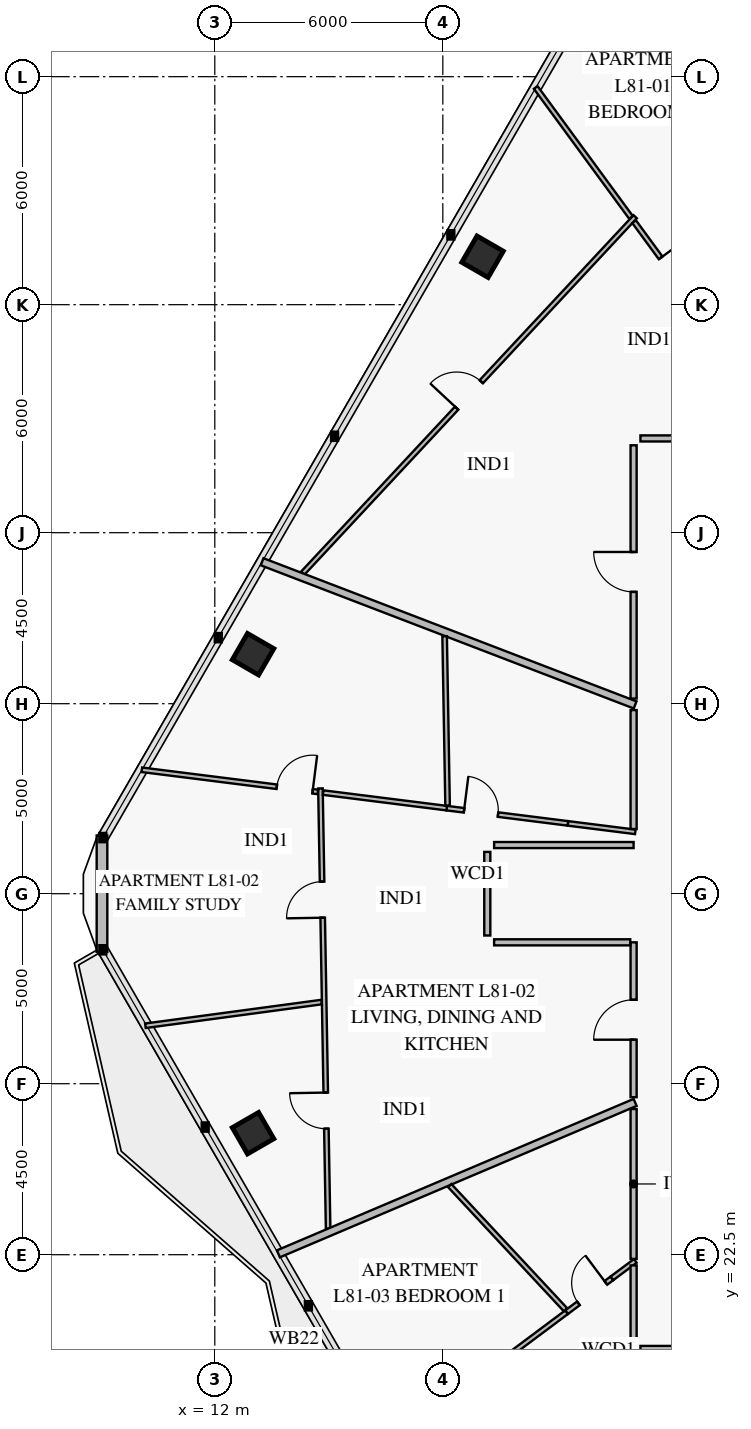
"""IFC4 building model, lengths in metres.
Left out: names, types, materials, properties, quantities, classifications, styles, units other than length and angle.
Written with IfcOpenShell. Run it as: python <this file> out.ifc"""

import sys

from ifc_helpers import new_model, si_unit, direction, frame, frame_2d, origin, origin_2d, place, context, subcontext, project, spatial, rectangle, extrude, element, fill, save


model = new_model("IFC4")
c1 = context("Model", 3, precision=1e-05, world=origin(), true_north=direction((0.0, 1.0)))
c2 = subcontext(c1, "Body", "Model", "MODEL_VIEW")
j1 = project(units=[si_unit("LENGTHUNIT", "METRE"), si_unit("PLANEANGLEUNIT", "RADIAN")], contexts=[c1])
p1 = place(None, origin())
s1 = spatial("IfcSite", under=j1, at=p1, CompositionType="ELEMENT")
p2 = place(p1, origin())
s2 = spatial("IfcBuilding", under=s1, at=p2, CompositionType="ELEMENT")
p3 = place(p2, frame((0.0, 0.0, 319.6)))
s3 = spatial("IfcBuildingStorey", under=s2, at=p3, CompositionType="ELEMENT", Elevation=319.6)
for number, where, z_axis, x_axis in (
    (1, (19.045, 48.762, 0.0), (0.0, 0.0, 1.0), (-0.5, -0.866, 0.0)),
    (2, (13.007, 38.302, 0.0), (0.0, 0.0, 1.0), (-0.5, -0.866, 0.0)),
    (3, (13.007, 25.698, 0.0), (0.0, 0.0, 1.0), (0.5, -0.866, 0.0)),
):
    element("IfcColumn", number, at=place(p3, frame(where, z_axis=z_axis, x_axis=x_axis)), inside=s3, PredefinedType="COLUMN", context=c2, shape_type="SweptSolid", body=[
        extrude(rectangle(XDim=0.8, YDim=0.8, at=origin_2d()), origin(), (0.0, 0.0, 1.0), 3.55),
    ])
p4 = place(p3, frame((9.031, 30.468, 0.0), z_axis=(0.0, 0.0, 1.0), x_axis=(0.0, 1.0, 0.0)))
e4 = element("IfcWall", 4, at=p4, inside=s3, PredefinedType="SOLIDWALL", context=c2, shape_type="SweptSolid", body=[
    extrude(rectangle(XDim=3.065, YDim=0.28, at=frame_2d((1.532, 0.0))), origin(), (0.0, 0.0, 1.0), 3.55),
])
p5 = place(p3, frame((23.062, 49.815, 0.0), z_axis=(0.0, 0.0, 1.0), x_axis=(-0.681996709379, -0.731355240903, 0.0)))
e5 = element("IfcWall", 5, at=p5, inside=s3, PredefinedType="PARTITIONING", context=c2, shape_type="SweptSolid", body=[
    extrude(rectangle(XDim=12.826, YDim=0.12, at=frame_2d((6.413, 0.0))), origin(), (0.0, 0.0, 1.0), 2.97),
])
p6 = place(p5, frame((5.938, 0.0, 0.0)))
e6 = element("IfcOpeningElement", 6, at=p6, cuts=e5, PredefinedType="OPENING", context=c2, shape_type="SweptSolid", body=[
    extrude(rectangle(XDim=0.95, YDim=2.1, at=frame_2d((0.475, 1.05))), frame((0.0, 0.072, 0.0), z_axis=(0.0, -1.0, 0.0), x_axis=(1.0, 0.0, 0.0)), (0.0, 0.0, 1.0), 0.144),
])
p7 = place(p3, frame((25.662, 46.099, 0.0), z_axis=(0.0, 0.0, 1.0), x_axis=(-0.591311292855, 0.806443398474, 0.0)))
e7 = element("IfcWall", 7, at=p7, inside=s3, PredefinedType="PARTITIONING", context=c2, shape_type="SweptSolid", body=[
    extrude(rectangle(XDim=4.446, YDim=0.12, at=frame_2d((2.223, 0.0))), origin(), (0.0, 0.0, 1.0), 3.55),
])
p8 = place(p7, frame((2.314, 0.0, 0.0)))
e8 = element("IfcOpeningElement", 8, at=p8, cuts=e7, PredefinedType="OPENING", context=c2, shape_type="SweptSolid", body=[
    extrude(rectangle(XDim=0.95, YDim=2.1, at=frame_2d((0.475, 1.05))), frame((0.0, 0.072, 0.0), z_axis=(0.0, -1.0, 0.0), x_axis=(1.0, 0.0, 0.0)), (0.0, 0.0, 1.0), 0.144),
])
p9 = place(p3, frame((22.951, 49.796, 0.0), z_axis=(0.0, 0.0, 1.0), x_axis=(-0.591303744842, 0.806448932875, 0.0)))
e9 = element("IfcWall", 9, at=p9, inside=s3, PredefinedType="PARTITIONING", context=c2, shape_type="SweptSolid", body=[
    extrude(rectangle(XDim=4.24, YDim=0.12, at=frame_2d((2.12, 0.0))), origin(), (0.0, 0.0, 1.0), 2.97),
])
p10 = place(p3, frame((23.02, 43.8, 0.0), z_axis=(0.0, 0.0, 1.0), x_axis=(0.0, -1.0, 0.0)))
e10 = element("IfcWall", 10, at=p10, inside=s3, PredefinedType="PARTITIONING", context=c2, shape_type="SweptSolid", body=[
    extrude(rectangle(XDim=6.666, YDim=0.16, at=frame_2d((3.333, 0.0))), origin(), (0.0, 0.0, 1.0), 3.55),
])
p11 = place(p10, frame((2.808, 0.0, 0.0)))
e11 = element("IfcOpeningElement", 11, at=p11, cuts=e10, PredefinedType="OPENING", context=c2, shape_type="SweptSolid", body=[
    extrude(rectangle(XDim=1.05, YDim=2.15, at=frame_2d((0.525, 1.075))), frame((0.0, 0.092, 0.0), z_axis=(0.0, -1.0, 0.0), x_axis=(1.0, 0.0, 0.0)), (0.0, 0.0, 1.0), 0.184),
])
p12 = place(p3, frame((14.78, 34.77, 0.0), z_axis=(0.0, 0.0, 1.0), x_axis=(0.017447291159, -0.999847784431, 0.0)))
e12 = element("IfcWall", 12, at=p12, inside=s3, PredefinedType="PARTITIONING", context=c2, shape_type="SweptSolid", body=[
    extrude(rectangle(XDim=11.586, YDim=0.12, at=frame_2d((5.793, 0.0))), origin(), (0.0, 0.0, 1.0), 3.0),
])
p13 = place(p12, frame((2.453, 0.0, 0.0)))
e13 = element("IfcOpeningElement", 13, at=p13, cuts=e12, PredefinedType="OPENING", context=c2, shape_type="SweptSolid", body=[
    extrude(rectangle(XDim=0.95, YDim=2.1, at=frame_2d((0.475, 1.05))), frame((0.0, 0.072, 0.0), z_axis=(0.0, -1.0, 0.0), x_axis=(1.0, 0.0, 0.0)), (0.0, 0.0, 1.0), 0.144),
])
p14 = place(p12, frame((8.005, 0.0, 0.0)))
e14 = element("IfcOpeningElement", 14, at=p14, cuts=e12, PredefinedType="OPENING", context=c2, shape_type="SweptSolid", body=[
    extrude(rectangle(XDim=0.95, YDim=2.1, at=frame_2d((0.475, 1.05))), frame((0.0, 0.072, 0.0), z_axis=(0.0, -1.0, 0.0), x_axis=(1.0, 0.0, 0.0)), (0.0, 0.0, 1.0), 0.144),
])
p15 = place(p3, frame((21.294, 33.85, 0.0), z_axis=(0.0, 0.0, 1.0), x_axis=(-0.992178326729, 0.1248285543, 0.0)))
e15 = element("IfcWall", 15, at=p15, inside=s3, PredefinedType="PARTITIONING", context=c2, shape_type="SweptSolid", body=[
    extrude(rectangle(XDim=3.217, YDim=0.12, at=frame_2d((1.609, 0.0))), origin(), (0.0, 0.0, 1.0), 3.55),
])
p16 = place(p15, frame((1.856, 0.0, 0.0)))
e16 = element("IfcOpeningElement", 16, at=p16, cuts=e15, PredefinedType="OPENING", context=c2, shape_type="SweptSolid", body=[
    extrude(rectangle(XDim=0.9, YDim=2.1, at=frame_2d((0.45, 1.05))), frame((0.0, 0.072, 0.0), z_axis=(0.0, -1.0, 0.0), x_axis=(1.0, 0.0, 0.0)), (0.0, 0.0, 1.0), 0.144),
])
p17 = place(p3, frame((18.102, 34.252, 0.0), z_axis=(0.0, 0.0, 1.0), x_axis=(-0.992185927593, 0.124768125279, 0.0)))
e17 = element("IfcWall", 17, at=p17, inside=s3, PredefinedType="PARTITIONING", context=c2, shape_type="SweptSolid", body=[
    extrude(rectangle(XDim=3.278, YDim=0.12, at=frame_2d((1.639, 0.0))), origin(), (0.0, 0.0, 1.0), 3.55),
])
p18 = place(p3, frame((14.713, 34.678, 0.0), z_axis=(0.0, 0.0, 1.0), x_axis=(-0.992180233529, 0.124813397493, 0.0)))
e18 = element("IfcWall", 18, at=p18, inside=s3, PredefinedType="PARTITIONING", context=c2, shape_type="SweptSolid", body=[
    extrude(rectangle(XDim=4.669, YDim=0.12, at=frame_2d((2.334, 0.0))), origin(), (0.0, 0.0, 1.0), 2.97),
])
p19 = place(p18, frame((0.14, 0.0, 0.0)))
e19 = element("IfcOpeningElement", 19, at=p19, cuts=e18, PredefinedType="OPENING", context=c2, shape_type="SweptSolid", body=[
    extrude(rectangle(XDim=0.95, YDim=2.1, at=frame_2d((0.475, 1.05))), frame((0.0, 0.072, 0.0), z_axis=(0.0, -1.0, 0.0), x_axis=(1.0, 0.0, 0.0)), (0.0, 0.0, 1.0), 0.144),
])
p20 = place(p3, frame((23.02, 30.72, 0.0), z_axis=(0.0, 0.0, 1.0), x_axis=(0.0, -1.0, 0.0)))
e20 = element("IfcWall", 20, at=p20, inside=s3, PredefinedType="PARTITIONING", context=c2, shape_type="SweptSolid", body=[
    extrude(rectangle(XDim=4.075, YDim=0.16, at=frame_2d((2.037, 0.0))), origin(), (0.0, 0.0, 1.0), 3.0),
])
p21 = place(p20, frame((1.512, 0.0, 0.0)))
e21 = element("IfcOpeningElement", 21, at=p21, cuts=e20, PredefinedType="OPENING", context=c2, shape_type="SweptSolid", body=[
    extrude(rectangle(XDim=1.05, YDim=2.15, at=frame_2d((0.525, 1.075))), frame((0.0, 0.092, 0.0), z_axis=(0.0, -1.0, 0.0), x_axis=(1.0, 0.0, 0.0)), (0.0, 0.0, 1.0), 0.184),
])
p22 = place(p3, frame((22.45, 21.878, 0.0), z_axis=(0.0, 0.0, 1.0), x_axis=(-0.801099101306, -0.598531728388, 0.0)))
e22 = element("IfcWall", 22, at=p22, inside=s3, PredefinedType="PARTITIONING", context=c2, shape_type="SweptSolid", body=[
    extrude(rectangle(XDim=1.491, YDim=0.12, at=frame_2d((0.746, 0.0))), origin(), (0.0, 0.0, 1.0), 3.2),
])
p23 = place(p22, frame((0.2, 0.0, 0.0)))
e23 = element("IfcOpeningElement", 23, at=p23, cuts=e22, PredefinedType="OPENING", context=c2, shape_type="SweptSolid", body=[
    extrude(rectangle(XDim=0.9, YDim=2.1, at=frame_2d((0.45, 1.05))), frame((0.0, 0.072, 0.0), z_axis=(0.0, -1.0, 0.0), x_axis=(1.0, 0.0, 0.0)), (0.0, 0.0, 1.0), 0.144),
])
p24 = place(p3, frame((21.256, 20.986, 0.0), z_axis=(0.0, 0.0, 1.0), x_axis=(-0.801154440429, -0.598457653122, 0.0)))
e24 = element("IfcWall", 24, at=p24, inside=s3, PredefinedType="PARTITIONING", context=c2, shape_type="SweptSolid", body=[
    extrude(rectangle(XDim=3.574, YDim=0.12, at=frame_2d((1.787, 0.0))), origin(), (0.0, 0.0, 1.0), 3.2),
])
p25 = place(p24, frame((2.422, 0.0, 0.0)))
e25 = element("IfcOpeningElement", 25, at=p25, cuts=e24, PredefinedType="OPENING", context=c2, shape_type="SweptSolid", body=[
    extrude(rectangle(XDim=0.95, YDim=2.1, at=frame_2d((0.475, 1.05))), frame((0.0, 0.072, 0.0), z_axis=(0.0, -1.0, 0.0), x_axis=(1.0, 0.0, 0.0)), (0.0, 0.0, 1.0), 0.144),
])
p26 = place(p3, frame((23.2, 20.02, 0.0), z_axis=(0.0, 0.0, 1.0), x_axis=(1.0, 0.0, 0.0)))
e26 = element("IfcWall", 26, at=p26, inside=s3, PredefinedType="PARTITIONING", context=c2, shape_type="SweptSolid", body=[
    extrude(rectangle(XDim=6.541, YDim=0.16, at=frame_2d((3.271, 0.0))), origin(), (0.0, 0.0, 1.0), 3.0),
])
p27 = place(p26, frame((2.746, 0.0, 0.0)))
e27 = element("IfcOpeningElement", 27, at=p27, cuts=e26, PredefinedType="OPENING", context=c2, shape_type="SweptSolid", body=[
    extrude(rectangle(XDim=1.05, YDim=2.15, at=frame_2d((0.525, 1.075))), frame((0.0, 0.092, 0.0), z_axis=(0.0, -1.0, 0.0), x_axis=(1.0, 0.0, 0.0)), (0.0, 0.0, 1.0), 0.184),
])
p28 = place(p3, frame((23.06, 36.967, 0.0), z_axis=(0.0, 0.0, 1.0), x_axis=(-0.933584200724, 0.358358117194, 0.0)))
e28 = element("IfcWall", 28, at=p28, inside=s3, PredefinedType="PARTITIONING", context=c2, shape_type="SweptSolid", body=[
    extrude(rectangle(XDim=10.513, YDim=0.2, at=frame_2d((5.257, 0.0))), origin(), (0.0, 0.0, 1.0), 2.97),
])
p29 = place(p3, frame((14.81, 29.148, 0.0), z_axis=(0.0, 0.0, 1.0), x_axis=(-0.99106212133, -0.133401168156, 0.0)))
e29 = element("IfcWall", 29, at=p29, inside=s3, PredefinedType="PARTITIONING", context=c2, shape_type="SweptSolid", body=[
    extrude(rectangle(XDim=4.678, YDim=0.12, at=frame_2d((2.339, 0.0))), origin(), (0.0, 0.0, 1.0), 2.97),
])
p30 = place(p3, frame((23.065, 33.627, 0.0), z_axis=(0.0, 0.0, 1.0), x_axis=(-0.992172307506, 0.124876387752, 0.0)))
e30 = element("IfcWall", 30, at=p30, inside=s3, PredefinedType="PARTITIONING", context=c2, shape_type="SweptSolid", body=[
    extrude(rectangle(XDim=1.785, YDim=0.12, at=frame_2d((0.893, 0.0))), origin(), (0.0, 0.0, 1.0), 3.55),
])
p31 = place(p3, frame((18.048, 38.776, 0.0), z_axis=(0.0, 0.0, 1.0), x_axis=(0.017410568339, -0.999848424567, 0.0)))
e31 = element("IfcWall", 31, at=p31, inside=s3, PredefinedType="PARTITIONING", context=c2, shape_type="SweptSolid", body=[
    extrude(rectangle(XDim=4.459, YDim=0.12, at=frame_2d((2.229, 0.0))), origin(), (0.0, 0.0, 1.0), 3.0),
])
p32 = place(p3, frame((23.06, 26.507, 0.0), z_axis=(0.0, 0.0, 1.0), x_axis=(-0.920506642252, -0.390726914314, 0.0)))
e32 = element("IfcWall", 32, at=p32, inside=s3, PredefinedType="PARTITIONING", context=c2, shape_type="SweptSolid", body=[
    extrude(rectangle(XDim=10.197, YDim=0.2, at=frame_2d((5.099, 0.0))), origin(), (0.0, 0.0, 1.0), 2.97),
])
p33 = place(p3, frame((23.065, 22.337, 0.0), z_axis=(0.0, 0.0, 1.0), x_axis=(-0.801257856401, -0.598319185348, 0.0)))
e33 = element("IfcWall", 33, at=p33, inside=s3, PredefinedType="PARTITIONING", context=c2, shape_type="SweptSolid", body=[
    extrude(rectangle(XDim=0.768, YDim=0.12, at=frame_2d((0.384, 0.0))), origin(), (0.0, 0.0, 1.0), 3.55),
])
p34 = place(p3, frame((18.181, 24.319, 0.0), z_axis=(0.0, 0.0, 1.0), x_axis=(0.682037898073, -0.73131682983, 0.0)))
e34 = element("IfcWall", 34, at=p34, inside=s3, PredefinedType="PARTITIONING", context=c2, shape_type="SweptSolid", body=[
    extrude(rectangle(XDim=4.469, YDim=0.12, at=frame_2d((2.234, 0.0))), origin(), (0.0, 0.0, 1.0), 3.2),
])
p35 = place(p3, frame((29.916, 20.06, 0.0), z_axis=(0.0, 0.0, 1.0), x_axis=(-0.453984595432, -0.891009532559, 0.0)))
e35 = element("IfcWall", 35, at=p35, inside=s3, PredefinedType="PARTITIONING", context=c2, shape_type="SweptSolid", body=[
    extrude(rectangle(XDim=13.618, YDim=0.2, at=frame_2d((6.809, 0.0))), origin(), (0.0, 0.0, 1.0), 2.97),
])
p36 = place(p3, frame((27.132, 43.98, 0.0), z_axis=(0.0, 0.0, 1.0), x_axis=(-1.0, 0.0, 0.0)))
e36 = element("IfcWall", 36, at=p36, inside=s3, PredefinedType="PARTITIONING", context=c2, shape_type="SweptSolid", body=[
    extrude(rectangle(XDim=3.932, YDim=0.16, at=frame_2d((1.966, 0.0))), origin(), (0.0, 0.0, 1.0), 3.0),
])
p37 = place(p3, frame((23.02, 33.28, 0.0), z_axis=(0.0, 0.0, 1.0), x_axis=(-1.0, 0.0, 0.0)))
e37 = element("IfcWall", 37, at=p37, inside=s3, PredefinedType="PARTITIONING", context=c2, shape_type="SweptSolid", body=[
    extrude(rectangle(XDim=3.67, YDim=0.16, at=frame_2d((1.835, 0.0))), origin(), (0.0, 0.0, 1.0), 3.55),
])
p38 = place(p3, frame((19.35, 30.72, 0.0), z_axis=(0.0, 0.0, 1.0), x_axis=(1.0, 0.0, 0.0)))
e38 = element("IfcWall", 38, at=p38, inside=s3, PredefinedType="PARTITIONING", context=c2, shape_type="SweptSolid", body=[
    extrude(rectangle(XDim=3.582, YDim=0.16, at=frame_2d((1.791, 0.0))), origin(), (0.0, 0.0, 1.0), 3.55),
])
p39 = place(p3, frame((19.17, 33.1, 0.0), z_axis=(0.0, 0.0, 1.0), x_axis=(0.0, -1.0, 0.0)))
e39 = element("IfcWall", 39, at=p39, inside=s3, PredefinedType="PARTITIONING", context=c2, shape_type="SweptSolid", body=[
    extrude(rectangle(XDim=2.2, YDim=0.16, at=frame_2d((1.1, 0.0))), origin(), (0.0, 0.0, 1.0), 3.55),
])
p40 = place(p3, frame((23.02, 36.832, 0.0), z_axis=(0.0, 0.0, 1.0), x_axis=(0.0, -1.0, 0.0)))
e40 = element("IfcWall", 40, at=p40, inside=s3, PredefinedType="PARTITIONING", context=c2, shape_type="SweptSolid", body=[
    extrude(rectangle(XDim=3.13, YDim=0.16, at=frame_2d((1.565, 0.0))), origin(), (0.0, 0.0, 1.0), 3.0),
])
p41 = place(p3, frame((23.02, 22.219, 0.0), z_axis=(0.0, 0.0, 1.0), x_axis=(0.0, -1.0, 0.0)))
e41 = element("IfcWall", 41, at=p41, inside=s3, PredefinedType="PARTITIONING", context=c2, shape_type="SweptSolid", body=[
    extrude(rectangle(XDim=2.019, YDim=0.16, at=frame_2d((1.01, 0.0))), origin(), (0.0, 0.0, 1.0), 3.55),
])
p42 = place(p3, frame((23.02, 26.334, 0.0), z_axis=(0.0, 0.0, 1.0), x_axis=(0.0, -1.0, 0.0)))
e42 = element("IfcWall", 42, at=p42, inside=s3, PredefinedType="PARTITIONING", context=c2, shape_type="SweptSolid", body=[
    extrude(rectangle(XDim=3.945, YDim=0.16, at=frame_2d((1.973, 0.0))), origin(), (0.0, 0.0, 1.0), 3.55),
])
p43 = place(p6, frame((0.95, 0.0, 0.0), z_axis=(0.0, 0.0, 1.0), x_axis=(-1.0, 0.0, 0.0)))
e43 = element("IfcDoor", 43, at=p43, inside=s3, OperationType="SINGLE_SWING_LEFT", PredefinedType="DOOR", context=c2, shape_type="SweptSolid", body=[
    extrude(rectangle(XDim=0.95, YDim=2.1, at=frame_2d((0.475, 1.05))), frame((0.0, 0.025, 0.0), z_axis=(0.0, -1.0, 0.0), x_axis=(1.0, 0.0, 0.0)), (0.0, 0.0, 1.0), 0.05),
])
fill(e6, e43)
p44 = place(p8, frame((0.95, 0.0, 0.0), z_axis=(0.0, 0.0, 1.0), x_axis=(-1.0, 0.0, 0.0)))
e44 = element("IfcDoor", 44, at=p44, inside=s3, OperationType="SINGLE_SWING_LEFT", PredefinedType="DOOR", context=c2, shape_type="SweptSolid", body=[
    extrude(rectangle(XDim=0.95, YDim=2.1, at=frame_2d((0.475, 1.05))), frame((0.0, 0.025, 0.0), z_axis=(0.0, -1.0, 0.0), x_axis=(1.0, 0.0, 0.0)), (0.0, 0.0, 1.0), 0.05),
])
fill(e8, e44)
p45 = place(p11, frame((1.05, 0.0, 0.0), z_axis=(0.0, 0.0, 1.0), x_axis=(-1.0, 0.0, 0.0)))
e45 = element("IfcDoor", 45, at=p45, inside=s3, OperationType="SINGLE_SWING_RIGHT", PredefinedType="DOOR", context=c2, shape_type="SweptSolid", body=[
    extrude(rectangle(XDim=1.05, YDim=2.15, at=frame_2d((0.525, 1.075))), frame((0.0, 0.025, 0.0), z_axis=(0.0, -1.0, 0.0), x_axis=(1.0, 0.0, 0.0)), (0.0, 0.0, 1.0), 0.05),
])
fill(e11, e45)
p46 = place(p13, frame((0.95, 0.0, 0.0), z_axis=(0.0, 0.0, 1.0), x_axis=(-1.0, 0.0, 0.0)))
e46 = element("IfcDoor", 46, at=p46, inside=s3, OperationType="SINGLE_SWING_LEFT", PredefinedType="DOOR", context=c2, shape_type="SweptSolid", body=[
    extrude(rectangle(XDim=0.95, YDim=2.1, at=frame_2d((0.475, 1.05))), frame((0.0, 0.025, 0.0), z_axis=(0.0, -1.0, 0.0), x_axis=(1.0, 0.0, 0.0)), (0.0, 0.0, 1.0), 0.05),
])
fill(e13, e46)
p47 = place(p14, frame((0.95, 0.0, 0.0), z_axis=(0.0, 0.0, 1.0), x_axis=(-1.0, 0.0, 0.0)))
e47 = element("IfcDoor", 47, at=p47, inside=s3, OperationType="SINGLE_SWING_RIGHT", PredefinedType="DOOR", context=c2, shape_type="SweptSolid", body=[
    extrude(rectangle(XDim=0.95, YDim=2.1, at=frame_2d((0.475, 1.05))), frame((0.0, 0.025, 0.0), z_axis=(0.0, -1.0, 0.0), x_axis=(1.0, 0.0, 0.0)), (0.0, 0.0, 1.0), 0.05),
])
fill(e14, e47)
p48 = place(p16, frame((0.9, 0.0, 0.0), z_axis=(0.0, 0.0, 1.0), x_axis=(-1.0, 0.0, 0.0)))
e48 = element("IfcDoor", 48, at=p48, inside=s3, OperationType="SINGLE_SWING_LEFT", PredefinedType="DOOR", context=c2, shape_type="SweptSolid", body=[
    extrude(rectangle(XDim=0.9, YDim=2.1, at=frame_2d((0.45, 1.05))), frame((0.0, 0.025, 0.0), z_axis=(0.0, -1.0, 0.0), x_axis=(1.0, 0.0, 0.0)), (0.0, 0.0, 1.0), 0.05),
])
fill(e16, e48)
p49 = place(p19, frame((0.95, 0.0, 0.0), z_axis=(0.0, 0.0, 1.0), x_axis=(-1.0, 0.0, 0.0)))
e49 = element("IfcDoor", 49, at=p49, inside=s3, OperationType="SINGLE_SWING_RIGHT", PredefinedType="DOOR", context=c2, shape_type="SweptSolid", body=[
    extrude(rectangle(XDim=0.95, YDim=2.1, at=frame_2d((0.475, 1.05))), frame((0.0, 0.025, 0.0), z_axis=(0.0, -1.0, 0.0), x_axis=(1.0, 0.0, 0.0)), (0.0, 0.0, 1.0), 0.05),
])
fill(e19, e49)
p50 = place(p21, frame((1.05, 0.0, 0.0), z_axis=(0.0, 0.0, 1.0), x_axis=(-1.0, 0.0, 0.0)))
e50 = element("IfcDoor", 50, at=p50, inside=s3, OperationType="SINGLE_SWING_LEFT", PredefinedType="DOOR", context=c2, shape_type="SweptSolid", body=[
    extrude(rectangle(XDim=1.05, YDim=2.15, at=frame_2d((0.525, 1.075))), frame((0.0, 0.025, 0.0), z_axis=(0.0, -1.0, 0.0), x_axis=(1.0, 0.0, 0.0)), (0.0, 0.0, 1.0), 0.05),
])
fill(e21, e50)
p51 = place(p23, frame((0.9, 0.0, 0.0), z_axis=(0.0, 0.0, 1.0), x_axis=(-1.0, 0.0, 0.0)))
e51 = element("IfcDoor", 51, at=p51, inside=s3, OperationType="SINGLE_SWING_RIGHT", PredefinedType="DOOR", context=c2, shape_type="SweptSolid", body=[
    extrude(rectangle(XDim=0.9, YDim=2.1, at=frame_2d((0.45, 1.05))), frame((0.0, 0.025, 0.0), z_axis=(0.0, -1.0, 0.0), x_axis=(1.0, 0.0, 0.0)), (0.0, 0.0, 1.0), 0.05),
])
fill(e23, e51)
save(model, sys.argv[1])
